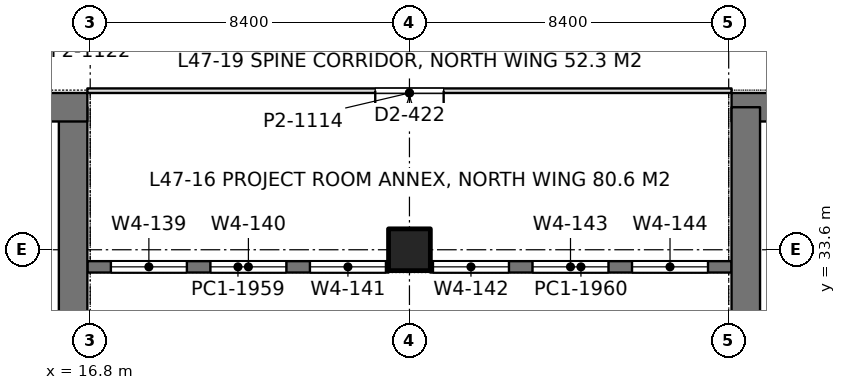
"""IFC4 building model, lengths in metres.
Left out: names, types, materials, properties, quantities, classifications, styles, units other than length and angle.
Written with IfcOpenShell. Run it as: python <this file> out.ifc"""

import sys

from ifc_helpers import new_model, si_unit, direction, frame, frame_2d, origin, origin_2d, place, context, subcontext, project, spatial, rectangle, extrude, element, fill, save


model = new_model("IFC4")
c1 = context("Model", 3, precision=1e-05, world=origin(), true_north=direction((0.0, 1.0)))
c2 = subcontext(c1, "Body", "Model", "MODEL_VIEW")
j1 = project(units=[si_unit("LENGTHUNIT", "METRE"), si_unit("PLANEANGLEUNIT", "RADIAN")], contexts=[c1])
p1 = place(None, origin())
s1 = spatial("IfcSite", under=j1, at=p1, CompositionType="ELEMENT")
p2 = place(p1, origin())
s2 = spatial("IfcBuilding", under=s1, at=p2, CompositionType="ELEMENT")
p3 = place(p2, frame((0.0, 0.0, 207.0)))
s3 = spatial("IfcBuildingStorey", under=s2, at=p3, CompositionType="ELEMENT", Elevation=207.0)
p4 = place(p3, frame((25.2, 33.6, 0.0), z_axis=(0.0, 0.0, 1.0), x_axis=(1.0, 0.0, 0.0)))
e1 = element("IfcColumn", 1, at=p4, inside=s3, PredefinedType="COLUMN", context=c2, shape_type="SweptSolid", body=[
    extrude(rectangle(XDim=1.1, YDim=1.1, at=origin_2d()), origin(), (0.0, 0.0, 1.0), 4.2),
])
p5 = place(p3, frame((-1.125, 37.35, 0.0), z_axis=(0.0, 0.0, 1.0), x_axis=(1.0, 0.0, 0.0)))
e2 = element("IfcWall", 2, at=p5, inside=s3, PredefinedType="SHEAR", context=c2, shape_type="SweptSolid", body=[
    extrude(rectangle(XDim=17.85, YDim=0.75, at=frame_2d((8.925, 0.0))), origin(), (0.0, 0.0, 1.0), 4.2),
])
p6 = place(p5, frame((8.875, 0.0, 0.0)))
e3 = element("IfcOpeningElement", 3, at=p6, cuts=e2, PredefinedType="OPENING", context=c2, shape_type="SweptSolid", body=[
    extrude(rectangle(XDim=1.8, YDim=2.4, at=frame_2d((0.9, 1.2))), frame((0.0, 0.385, 0.0), z_axis=(0.0, -1.0, 0.0), x_axis=(1.0, 0.0, 0.0)), (0.0, 0.0, 1.0), 0.77),
])
p7 = place(p3, frame((16.35, 27.8, 0.0), z_axis=(0.0, 0.0, 1.0), x_axis=(0.0, 1.0, 0.0)))
e4 = element("IfcWall", 4, at=p7, inside=s3, PredefinedType="SHEAR", context=c2, shape_type="SweptSolid", body=[
    extrude(rectangle(XDim=9.55, YDim=0.75, at=frame_2d((4.775, 0.0))), origin(), (0.0, 0.0, 1.0), 4.2),
])
p8 = place(p3, frame((33.675, 37.35, 0.0), z_axis=(0.0, 0.0, 1.0), x_axis=(1.0, 0.0, 0.0)))
e5 = element("IfcWall", 5, at=p8, inside=s3, PredefinedType="SHEAR", context=c2, shape_type="SweptSolid", body=[
    extrude(rectangle(XDim=17.85, YDim=0.75, at=frame_2d((8.925, 0.0))), origin(), (0.0, 0.0, 1.0), 4.2),
])
p9 = place(p8, frame((7.175, 0.0, 0.0)))
e6 = element("IfcOpeningElement", 6, at=p9, cuts=e5, PredefinedType="OPENING", context=c2, shape_type="SweptSolid", body=[
    extrude(rectangle(XDim=1.8, YDim=2.4, at=frame_2d((0.9, 1.2))), frame((0.0, 0.385, 0.0), z_axis=(0.0, -1.0, 0.0), x_axis=(1.0, 0.0, 0.0)), (0.0, 0.0, 1.0), 0.77),
])
p10 = place(p3, frame((34.05, 27.8, 0.0), z_axis=(0.0, 0.0, 1.0), x_axis=(0.0, 1.0, 0.0)))
e7 = element("IfcWall", 7, at=p10, inside=s3, PredefinedType="SHEAR", context=c2, shape_type="SweptSolid", body=[
    extrude(rectangle(XDim=9.55, YDim=0.75, at=frame_2d((4.775, 0.0))), origin(), (0.0, 0.0, 1.0), 4.2),
])
p11 = place(p3, frame((16.725, 33.15, 0.0), z_axis=(0.0, 0.0, 1.0), x_axis=(1.0, 0.0, 0.0)))
e8 = element("IfcWall", 8, at=p11, inside=s3, PredefinedType="SOLIDWALL", context=c2, shape_type="SweptSolid", body=[
    extrude(rectangle(XDim=7.925, YDim=0.3, at=frame_2d((3.962, 0.0))), origin(), (0.0, 0.0, 1.0), 4.05),
])
p12 = place(p11, frame((0.619, 0.0, 0.9)))
e9 = element("IfcOpeningElement", 9, at=p12, cuts=e8, PredefinedType="OPENING", context=c2, shape_type="SweptSolid", body=[
    extrude(rectangle(XDim=2.0, YDim=1.9, at=frame_2d((1.0, 0.95))), frame((0.0, 0.16, 0.0), z_axis=(0.0, -1.0, 0.0), x_axis=(1.0, 0.0, 0.0)), (0.0, 0.0, 1.0), 0.32),
])
p13 = place(p11, frame((3.238, 0.0, 0.9)))
e10 = element("IfcOpeningElement", 10, at=p13, cuts=e8, PredefinedType="OPENING", context=c2, shape_type="SweptSolid", body=[
    extrude(rectangle(XDim=2.0, YDim=1.9, at=frame_2d((1.0, 0.95))), frame((0.0, 0.16, 0.0), z_axis=(0.0, -1.0, 0.0), x_axis=(1.0, 0.0, 0.0)), (0.0, 0.0, 1.0), 0.32),
])
p14 = place(p11, frame((5.856, 0.0, 0.9)))
e11 = element("IfcOpeningElement", 11, at=p14, cuts=e8, PredefinedType="OPENING", context=c2, shape_type="SweptSolid", body=[
    extrude(rectangle(XDim=2.0, YDim=1.9, at=frame_2d((1.0, 0.95))), frame((0.0, 0.16, 0.0), z_axis=(0.0, -1.0, 0.0), x_axis=(1.0, 0.0, 0.0)), (0.0, 0.0, 1.0), 0.32),
])
p15 = place(p3, frame((25.75, 33.15, 0.0), z_axis=(0.0, 0.0, 1.0), x_axis=(1.0, 0.0, 0.0)))
e12 = element("IfcWall", 12, at=p15, inside=s3, PredefinedType="SOLIDWALL", context=c2, shape_type="SweptSolid", body=[
    extrude(rectangle(XDim=7.925, YDim=0.3, at=frame_2d((3.962, 0.0))), origin(), (0.0, 0.0, 1.0), 4.05),
])
p16 = place(p15, frame((0.069, 0.0, 0.9)))
e13 = element("IfcOpeningElement", 13, at=p16, cuts=e12, PredefinedType="OPENING", context=c2, shape_type="SweptSolid", body=[
    extrude(rectangle(XDim=2.0, YDim=1.9, at=frame_2d((1.0, 0.95))), frame((0.0, 0.16, 0.0), z_axis=(0.0, -1.0, 0.0), x_axis=(1.0, 0.0, 0.0)), (0.0, 0.0, 1.0), 0.32),
])
p17 = place(p15, frame((2.688, 0.0, 0.9)))
e14 = element("IfcOpeningElement", 14, at=p17, cuts=e12, PredefinedType="OPENING", context=c2, shape_type="SweptSolid", body=[
    extrude(rectangle(XDim=2.0, YDim=1.9, at=frame_2d((1.0, 0.95))), frame((0.0, 0.16, 0.0), z_axis=(0.0, -1.0, 0.0), x_axis=(1.0, 0.0, 0.0)), (0.0, 0.0, 1.0), 0.32),
])
p18 = place(p15, frame((5.306, 0.0, 0.9)))
e15 = element("IfcOpeningElement", 15, at=p18, cuts=e12, PredefinedType="OPENING", context=c2, shape_type="SweptSolid", body=[
    extrude(rectangle(XDim=2.0, YDim=1.9, at=frame_2d((1.0, 0.95))), frame((0.0, 0.16, 0.0), z_axis=(0.0, -1.0, 0.0), x_axis=(1.0, 0.0, 0.0)), (0.0, 0.0, 1.0), 0.32),
])
p19 = place(p3, frame((16.725, 37.785, 0.0), z_axis=(0.0, 0.0, 1.0), x_axis=(1.0, 0.0, 0.0)))
e16 = element("IfcWall", 16, at=p19, inside=s3, PredefinedType="PARTITIONING", context=c2, shape_type="SweptSolid", body=[
    extrude(rectangle(XDim=16.95, YDim=0.12, at=frame_2d((8.475, 0.0))), origin(), (0.0, 0.0, 1.0), 3.55),
])
p20 = place(p19, frame((7.575, 0.0, 0.0)))
e17 = element("IfcOpeningElement", 17, at=p20, cuts=e16, PredefinedType="OPENING", context=c2, shape_type="SweptSolid", body=[
    extrude(rectangle(XDim=1.8, YDim=2.2, at=frame_2d((0.9, 1.1))), frame((0.0, 0.07, 0.0), z_axis=(0.0, -1.0, 0.0), x_axis=(1.0, 0.0, 0.0)), (0.0, 0.0, 1.0), 0.14),
])
p21 = place(p12, origin())
e18 = element("IfcWindow", 18, at=p21, inside=s3, PartitioningType="SINGLE_PANEL", PredefinedType="WINDOW", context=c2, shape_type="SweptSolid", body=[
    extrude(rectangle(XDim=2.0, YDim=1.9, at=frame_2d((1.0, 0.95))), frame((0.0, 0.03, 0.0), z_axis=(0.0, -1.0, 0.0), x_axis=(1.0, 0.0, 0.0)), (0.0, 0.0, 1.0), 0.06),
])
fill(e9, e18)
p22 = place(p13, origin())
e19 = element("IfcWindow", 19, at=p22, inside=s3, PartitioningType="SINGLE_PANEL", PredefinedType="WINDOW", context=c2, shape_type="SweptSolid", body=[
    extrude(rectangle(XDim=2.0, YDim=1.9, at=frame_2d((1.0, 0.95))), frame((0.0, 0.03, 0.0), z_axis=(0.0, -1.0, 0.0), x_axis=(1.0, 0.0, 0.0)), (0.0, 0.0, 1.0), 0.06),
])
fill(e10, e19)
p23 = place(p14, origin())
e20 = element("IfcWindow", 20, at=p23, inside=s3, PartitioningType="SINGLE_PANEL", PredefinedType="WINDOW", context=c2, shape_type="SweptSolid", body=[
    extrude(rectangle(XDim=2.0, YDim=1.9, at=frame_2d((1.0, 0.95))), frame((0.0, 0.03, 0.0), z_axis=(0.0, -1.0, 0.0), x_axis=(1.0, 0.0, 0.0)), (0.0, 0.0, 1.0), 0.06),
])
fill(e11, e20)
p24 = place(p16, origin())
e21 = element("IfcWindow", 21, at=p24, inside=s3, PartitioningType="SINGLE_PANEL", PredefinedType="WINDOW", context=c2, shape_type="SweptSolid", body=[
    extrude(rectangle(XDim=2.0, YDim=1.9, at=frame_2d((1.0, 0.95))), frame((0.0, 0.03, 0.0), z_axis=(0.0, -1.0, 0.0), x_axis=(1.0, 0.0, 0.0)), (0.0, 0.0, 1.0), 0.06),
])
fill(e13, e21)
p25 = place(p17, origin())
e22 = element("IfcWindow", 22, at=p25, inside=s3, PartitioningType="SINGLE_PANEL", PredefinedType="WINDOW", context=c2, shape_type="SweptSolid", body=[
    extrude(rectangle(XDim=2.0, YDim=1.9, at=frame_2d((1.0, 0.95))), frame((0.0, 0.03, 0.0), z_axis=(0.0, -1.0, 0.0), x_axis=(1.0, 0.0, 0.0)), (0.0, 0.0, 1.0), 0.06),
])
fill(e14, e22)
p26 = place(p18, origin())
e23 = element("IfcWindow", 23, at=p26, inside=s3, PartitioningType="SINGLE_PANEL", PredefinedType="WINDOW", context=c2, shape_type="SweptSolid", body=[
    extrude(rectangle(XDim=2.0, YDim=1.9, at=frame_2d((1.0, 0.95))), frame((0.0, 0.03, 0.0), z_axis=(0.0, -1.0, 0.0), x_axis=(1.0, 0.0, 0.0)), (0.0, 0.0, 1.0), 0.06),
])
fill(e15, e23)
p27 = place(p20, frame((1.8, 0.0, 0.0), z_axis=(0.0, 0.0, 1.0), x_axis=(-1.0, 0.0, 0.0)))
e24 = element("IfcDoor", 24, at=p27, inside=s3, OperationType="DOUBLE_DOOR_SINGLE_SWING", PredefinedType="DOOR", context=c2, shape_type="SweptSolid", body=[
    extrude(rectangle(XDim=1.8, YDim=2.2, at=frame_2d((0.9, 1.1))), frame((0.0, 0.025, 0.0), z_axis=(0.0, -1.0, 0.0), x_axis=(1.0, 0.0, 0.0)), (0.0, 0.0, 1.0), 0.05),
])
fill(e17, e24)
save(model, sys.argv[1])
